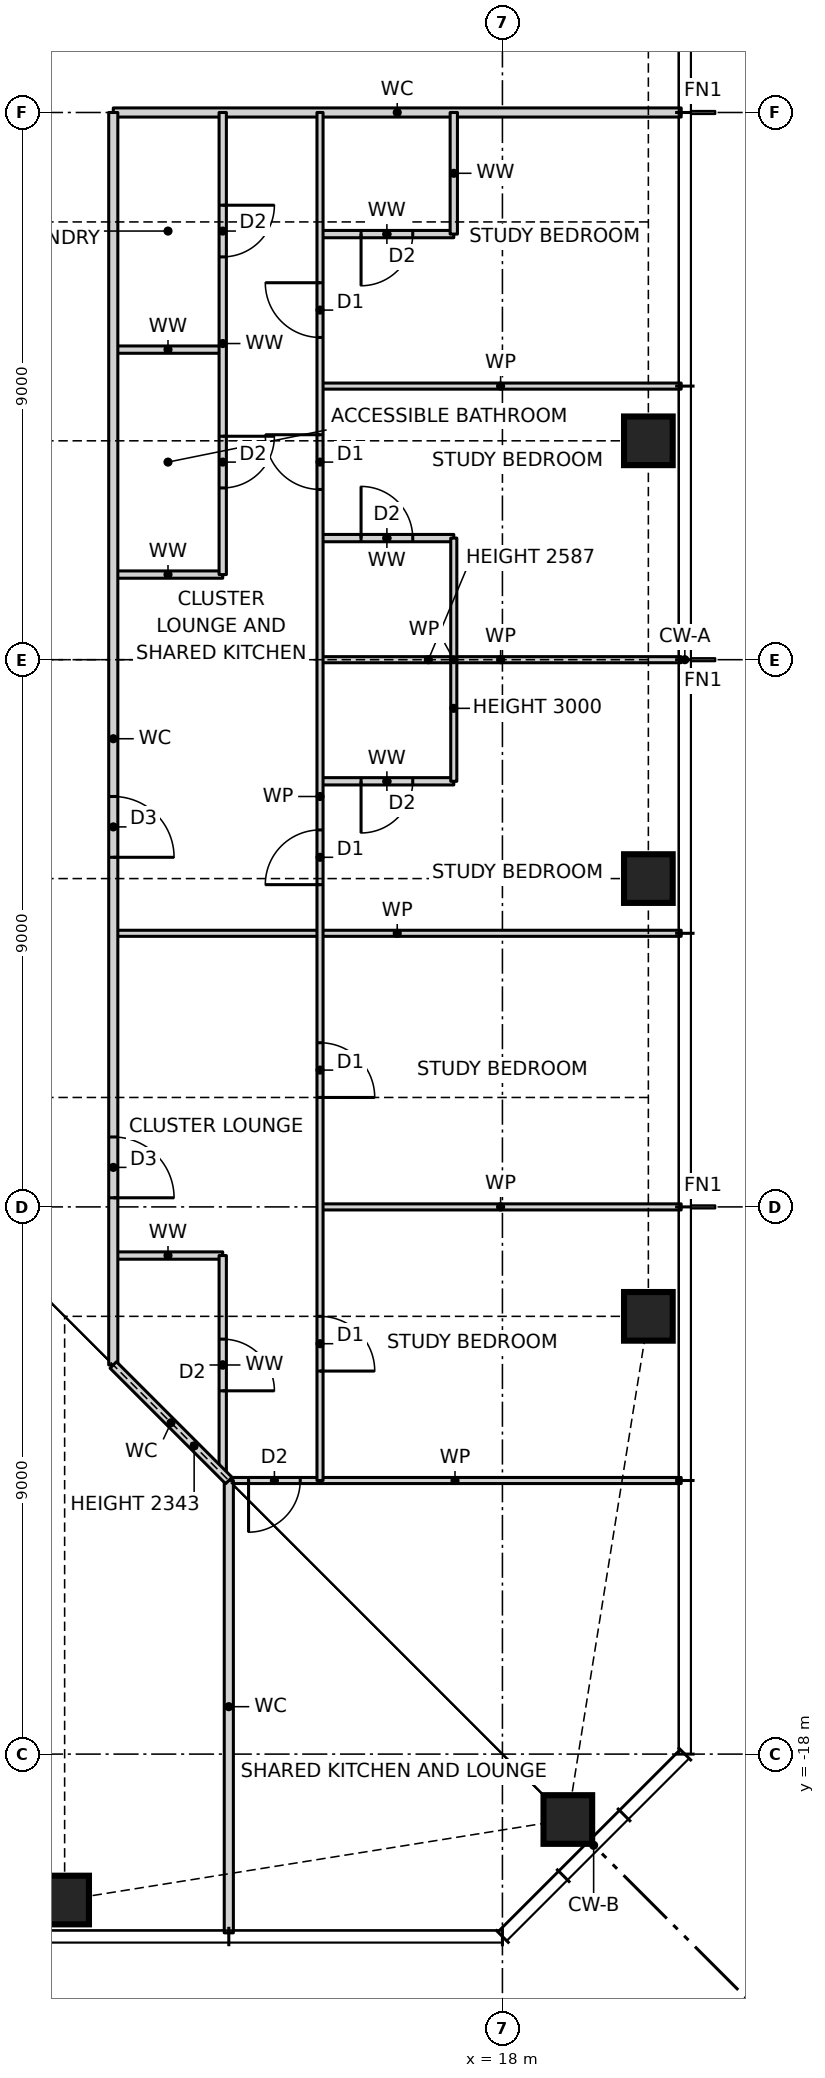
"""IFC4 building model, lengths in metres.
Left out: names, types, materials, properties, quantities, classifications, styles, units other than length and angle.
Written with IfcOpenShell. Run it as: python <this file> out.ifc"""

import sys

from ifc_helpers import new_model, si_unit, direction, frame, frame_2d, origin, origin_2d, place, context, subcontext, project, spatial, rectangle, hollow_rectangle, extrude, element, fill, save


model = new_model("IFC4")
c1 = context("Model", 3, precision=1e-05, world=origin(), true_north=direction((0.0, 1.0)))
c2 = subcontext(c1, "Body", "Model", "MODEL_VIEW")
j1 = project(units=[si_unit("LENGTHUNIT", "METRE"), si_unit("PLANEANGLEUNIT", "RADIAN")], contexts=[c1])
p1 = place(None, origin())
s1 = spatial("IfcSite", under=j1, at=p1, CompositionType="ELEMENT")
p2 = place(p1, origin())
s2 = spatial("IfcBuilding", under=s1, at=p2, CompositionType="ELEMENT")
p3 = place(p2, frame((0.0, 0.0, 133.0)))
s3 = spatial("IfcBuildingStorey", under=s2, at=p3, CompositionType="ELEMENT", Elevation=133.0)
for number, where, z_axis, x_axis in (
    (1, (10.8, -20.4, 0.0), (0.0, 0.0, 1.0), (1.0, 0.0, 0.0)),
    (2, (19.076, -19.076, 0.0), (0.0, 0.0, 1.0), (1.0, 0.0, 0.0)),
    (3, (20.4, -10.8, 0.0), (0.0, 0.0, 1.0), (1.0, 0.0, 0.0)),
    (4, (20.4, -3.6, 0.0), (0.0, 0.0, 1.0), (1.0, 0.0, 0.0)),
    (5, (20.4, 3.6, 0.0), (0.0, 0.0, 1.0), (1.0, 0.0, 0.0)),
):
    element("IfcColumn", number, at=place(p3, frame(where, z_axis=z_axis, x_axis=x_axis)), inside=s3, PredefinedType="COLUMN", context=c2, shape_type="SweptSolid", body=[
        extrude(hollow_rectangle(XDim=0.8, YDim=0.8, WallThickness=0.07, at=origin_2d()), origin(), (0.0, 0.0, 1.0), 3.5),
    ])
p4 = place(p3, frame((13.5, -13.5, 0.0), z_axis=(0.0, 0.0, 1.0), x_axis=(1.0, 0.0, 0.0)))
e6 = element("IfcWall", 6, at=p4, inside=s3, PredefinedType="PARTITIONING", context=c2, shape_type="SweptSolid", body=[
    extrude(rectangle(XDim=7.44, YDim=0.1, at=frame_2d((3.72, 0.0))), origin(), (0.0, 0.0, 1.0), 3.27),
])
p5 = place(p4, frame((0.325, 0.0, 0.0)))
e7 = element("IfcOpeningElement", 7, at=p5, cuts=e6, PredefinedType="OPENING", context=c2, shape_type="SweptSolid", body=[
    extrude(rectangle(XDim=0.85, YDim=2.1, at=frame_2d((0.425, 1.05))), frame((0.0, 0.06, 0.0), z_axis=(0.0, -1.0, 0.0), x_axis=(1.0, 0.0, 0.0)), (0.0, 0.0, 1.0), 0.12),
])
p6 = place(p3, frame((11.6, -9.8, 0.0), z_axis=(0.0, 0.0, 1.0), x_axis=(1.0, 0.0, 0.0)))
e8 = element("IfcWall", 8, at=p6, inside=s3, PredefinedType="PARTITIONING", context=c2, shape_type="SweptSolid", body=[
    extrude(rectangle(XDim=1.8, YDim=0.12, at=frame_2d((0.9, 0.0))), origin(), (0.0, 0.0, 1.0), 3.27),
])
p7 = place(p3, frame((15.0, -9.0, 0.0), z_axis=(0.0, 0.0, 1.0), x_axis=(1.0, 0.0, 0.0)))
e9 = element("IfcWall", 9, at=p7, inside=s3, PredefinedType="PARTITIONING", context=c2, shape_type="SweptSolid", body=[
    extrude(rectangle(XDim=5.94, YDim=0.1, at=frame_2d((2.97, 0.0))), origin(), (0.0, 0.0, 1.0), 3.27),
])
p8 = place(p3, frame((11.6, -4.5, 0.0), z_axis=(0.0, 0.0, 1.0), x_axis=(1.0, 0.0, 0.0)))
e10 = element("IfcWall", 10, at=p8, inside=s3, PredefinedType="PARTITIONING", context=c2, shape_type="SweptSolid", body=[
    extrude(rectangle(XDim=9.34, YDim=0.1, at=frame_2d((4.67, 0.0))), origin(), (0.0, 0.0, 1.0), 3.27),
])
p9 = place(p3, frame((15.0, -2.0, 0.0), z_axis=(0.0, 0.0, 1.0), x_axis=(1.0, 0.0, 0.0)))
e11 = element("IfcWall", 11, at=p9, inside=s3, PredefinedType="PARTITIONING", context=c2, shape_type="SweptSolid", body=[
    extrude(rectangle(XDim=2.2, YDim=0.12, at=frame_2d((1.1, 0.0))), origin(), (0.0, 0.0, 1.0), 3.27),
])
p10 = place(p9, frame((0.675, 0.0, 0.0)))
e12 = element("IfcOpeningElement", 12, at=p10, cuts=e11, PredefinedType="OPENING", context=c2, shape_type="SweptSolid", body=[
    extrude(rectangle(XDim=0.85, YDim=2.1, at=frame_2d((0.425, 1.05))), frame((0.0, 0.07, 0.0), z_axis=(0.0, -1.0, 0.0), x_axis=(1.0, 0.0, 0.0)), (0.0, 0.0, 1.0), 0.14),
])
p11 = place(p3, frame((15.0, 0.0, 0.0), z_axis=(0.0, 0.0, 1.0), x_axis=(1.0, 0.0, 0.0)))
e13 = element("IfcWall", 13, at=p11, inside=s3, PredefinedType="PARTITIONING", context=c2, shape_type="SweptSolid", body=[
    extrude(rectangle(XDim=5.94, YDim=0.1, at=frame_2d((2.97, 0.0))), origin(), (0.0, 0.0, 1.0), 2.587),
])
p12 = place(p3, frame((11.6, 1.4, 0.0), z_axis=(0.0, 0.0, 1.0), x_axis=(1.0, 0.0, 0.0)))
e14 = element("IfcWall", 14, at=p12, inside=s3, PredefinedType="PARTITIONING", context=c2, shape_type="SweptSolid", body=[
    extrude(rectangle(XDim=1.8, YDim=0.12, at=frame_2d((0.9, 0.0))), origin(), (0.0, 0.0, 1.0), 3.27),
])
p13 = place(p3, frame((15.0, 2.0, 0.0), z_axis=(0.0, 0.0, 1.0), x_axis=(1.0, 0.0, 0.0)))
e15 = element("IfcWall", 15, at=p13, inside=s3, PredefinedType="PARTITIONING", context=c2, shape_type="SweptSolid", body=[
    extrude(rectangle(XDim=2.2, YDim=0.12, at=frame_2d((1.1, 0.0))), origin(), (0.0, 0.0, 1.0), 3.27),
])
p14 = place(p13, frame((0.675, 0.0, 0.0)))
e16 = element("IfcOpeningElement", 16, at=p14, cuts=e15, PredefinedType="OPENING", context=c2, shape_type="SweptSolid", body=[
    extrude(rectangle(XDim=0.85, YDim=2.1, at=frame_2d((0.425, 1.05))), frame((0.0, 0.07, 0.0), z_axis=(0.0, -1.0, 0.0), x_axis=(1.0, 0.0, 0.0)), (0.0, 0.0, 1.0), 0.14),
])
p15 = place(p3, frame((15.0, 4.5, 0.0), z_axis=(0.0, 0.0, 1.0), x_axis=(1.0, 0.0, 0.0)))
e17 = element("IfcWall", 17, at=p15, inside=s3, PredefinedType="PARTITIONING", context=c2, shape_type="SweptSolid", body=[
    extrude(rectangle(XDim=5.94, YDim=0.1, at=frame_2d((2.97, 0.0))), origin(), (0.0, 0.0, 1.0), 3.27),
])
p16 = place(p3, frame((11.6, 5.1, 0.0), z_axis=(0.0, 0.0, 1.0), x_axis=(1.0, 0.0, 0.0)))
e18 = element("IfcWall", 18, at=p16, inside=s3, PredefinedType="PARTITIONING", context=c2, shape_type="SweptSolid", body=[
    extrude(rectangle(XDim=1.8, YDim=0.12, at=frame_2d((0.9, 0.0))), origin(), (0.0, 0.0, 1.0), 3.27),
])
p17 = place(p3, frame((15.0, 7.0, 0.0), z_axis=(0.0, 0.0, 1.0), x_axis=(1.0, 0.0, 0.0)))
e19 = element("IfcWall", 19, at=p17, inside=s3, PredefinedType="PARTITIONING", context=c2, shape_type="SweptSolid", body=[
    extrude(rectangle(XDim=2.2, YDim=0.12, at=frame_2d((1.1, 0.0))), origin(), (0.0, 0.0, 1.0), 3.27),
])
p18 = place(p17, frame((0.675, 0.0, 0.0)))
e20 = element("IfcOpeningElement", 20, at=p18, cuts=e19, PredefinedType="OPENING", context=c2, shape_type="SweptSolid", body=[
    extrude(rectangle(XDim=0.85, YDim=2.1, at=frame_2d((0.425, 1.05))), frame((0.0, 0.07, 0.0), z_axis=(0.0, -1.0, 0.0), x_axis=(1.0, 0.0, 0.0)), (0.0, 0.0, 1.0), 0.14),
])
p19 = place(p3, frame((11.6, 9.0, 0.0), z_axis=(0.0, 0.0, 1.0), x_axis=(1.0, 0.0, 0.0)))
e21 = element("IfcWall", 21, at=p19, inside=s3, PredefinedType="PARTITIONING", context=c2, shape_type="SweptSolid", body=[
    extrude(rectangle(XDim=9.34, YDim=0.15, at=frame_2d((4.67, 0.0))), origin(), (0.0, 0.0, 1.0), 3.27),
])
p20 = place(p3, frame((17.2, -2.0, 0.0), z_axis=(0.0, 0.0, 1.0), x_axis=(0.0, 1.0, 0.0)))
e22 = element("IfcWall", 22, at=p20, inside=s3, PredefinedType="PARTITIONING", context=c2, shape_type="SweptSolid", body=[
    extrude(rectangle(XDim=4.0, YDim=0.1, at=frame_2d((2.0, 0.0))), origin(), (0.0, 0.0, 1.0), 3.0),
])
p21 = place(p3, frame((17.2, 7.0, 0.0), z_axis=(0.0, 0.0, 1.0), x_axis=(0.0, 1.0, 0.0)))
e23 = element("IfcWall", 23, at=p21, inside=s3, PredefinedType="PARTITIONING", context=c2, shape_type="SweptSolid", body=[
    extrude(rectangle(XDim=2.0, YDim=0.12, at=frame_2d((1.0, 0.0))), origin(), (0.0, 0.0, 1.0), 3.27),
])
p22 = place(p3, frame((15.0, -13.5, 0.0), z_axis=(0.0, 0.0, 1.0), x_axis=(0.0, 1.0, 0.0)))
e24 = element("IfcWall", 24, at=p22, inside=s3, PredefinedType="PARTITIONING", context=c2, shape_type="SweptSolid", body=[
    extrude(rectangle(XDim=22.5, YDim=0.1, at=frame_2d((11.25, 0.0))), origin(), (0.0, 0.0, 1.0), 3.27),
])
p23 = place(p22, frame((1.8, 0.0, 0.0)))
e25 = element("IfcOpeningElement", 25, at=p23, cuts=e24, PredefinedType="OPENING", context=c2, shape_type="SweptSolid", body=[
    extrude(rectangle(XDim=0.9, YDim=2.1, at=frame_2d((0.45, 1.05))), frame((0.0, 0.06, 0.0), z_axis=(0.0, -1.0, 0.0), x_axis=(1.0, 0.0, 0.0)), (0.0, 0.0, 1.0), 0.12),
])
p24 = place(p22, frame((6.3, 0.0, 0.0)))
e26 = element("IfcOpeningElement", 26, at=p24, cuts=e24, PredefinedType="OPENING", context=c2, shape_type="SweptSolid", body=[
    extrude(rectangle(XDim=0.9, YDim=2.1, at=frame_2d((0.45, 1.05))), frame((0.0, 0.06, 0.0), z_axis=(0.0, -1.0, 0.0), x_axis=(1.0, 0.0, 0.0)), (0.0, 0.0, 1.0), 0.12),
])
p25 = place(p22, frame((9.8, 0.0, 0.0)))
e27 = element("IfcOpeningElement", 27, at=p25, cuts=e24, PredefinedType="OPENING", context=c2, shape_type="SweptSolid", body=[
    extrude(rectangle(XDim=0.9, YDim=2.1, at=frame_2d((0.45, 1.05))), frame((0.0, 0.06, 0.0), z_axis=(0.0, -1.0, 0.0), x_axis=(1.0, 0.0, 0.0)), (0.0, 0.0, 1.0), 0.12),
])
p26 = place(p22, frame((16.3, 0.0, 0.0)))
e28 = element("IfcOpeningElement", 28, at=p26, cuts=e24, PredefinedType="OPENING", context=c2, shape_type="SweptSolid", body=[
    extrude(rectangle(XDim=0.9, YDim=2.1, at=frame_2d((0.45, 1.05))), frame((0.0, 0.06, 0.0), z_axis=(0.0, -1.0, 0.0), x_axis=(1.0, 0.0, 0.0)), (0.0, 0.0, 1.0), 0.12),
])
p27 = place(p22, frame((18.8, 0.0, 0.0)))
e29 = element("IfcOpeningElement", 29, at=p27, cuts=e24, PredefinedType="OPENING", context=c2, shape_type="SweptSolid", body=[
    extrude(rectangle(XDim=0.9, YDim=2.1, at=frame_2d((0.45, 1.05))), frame((0.0, 0.06, 0.0), z_axis=(0.0, -1.0, 0.0), x_axis=(1.0, 0.0, 0.0)), (0.0, 0.0, 1.0), 0.12),
])
p28 = place(p3, frame((13.5, -20.94, 0.0), z_axis=(0.0, 0.0, 1.0), x_axis=(0.0, 1.0, 0.0)))
e30 = element("IfcWall", 30, at=p28, inside=s3, PredefinedType="PARTITIONING", context=c2, shape_type="SweptSolid", body=[
    extrude(rectangle(XDim=7.44, YDim=0.15, at=frame_2d((3.72, 0.0))), origin(), (0.0, 0.0, 1.0), 3.27),
])
p29 = place(p3, frame((13.4, -13.4, 0.0), z_axis=(0.0, 0.0, 1.0), x_axis=(0.0, 1.0, 0.0)))
e31 = element("IfcWall", 31, at=p29, inside=s3, PredefinedType="PARTITIONING", context=c2, shape_type="SweptSolid", body=[
    extrude(rectangle(XDim=3.6, YDim=0.12, at=frame_2d((1.8, 0.0))), origin(), (0.0, 0.0, 1.0), 3.27),
])
p30 = place(p29, frame((1.375, 0.0, 0.0)))
e32 = element("IfcOpeningElement", 32, at=p30, cuts=e31, PredefinedType="OPENING", context=c2, shape_type="SweptSolid", body=[
    extrude(rectangle(XDim=0.85, YDim=2.1, at=frame_2d((0.425, 1.05))), frame((0.0, 0.07, 0.0), z_axis=(0.0, -1.0, 0.0), x_axis=(1.0, 0.0, 0.0)), (0.0, 0.0, 1.0), 0.14),
])
p31 = place(p3, frame((13.4, 1.4, 0.0), z_axis=(0.0, 0.0, 1.0), x_axis=(0.0, 1.0, 0.0)))
e33 = element("IfcWall", 33, at=p31, inside=s3, PredefinedType="PARTITIONING", context=c2, shape_type="SweptSolid", body=[
    extrude(rectangle(XDim=7.6, YDim=0.12, at=frame_2d((3.8, 0.0))), origin(), (0.0, 0.0, 1.0), 3.27),
])
p32 = place(p31, frame((1.425, 0.0, 0.0)))
e34 = element("IfcOpeningElement", 34, at=p32, cuts=e33, PredefinedType="OPENING", context=c2, shape_type="SweptSolid", body=[
    extrude(rectangle(XDim=0.85, YDim=2.1, at=frame_2d((0.425, 1.05))), frame((0.0, 0.07, 0.0), z_axis=(0.0, -1.0, 0.0), x_axis=(1.0, 0.0, 0.0)), (0.0, 0.0, 1.0), 0.14),
])
p33 = place(p31, frame((5.225, 0.0, 0.0)))
e35 = element("IfcOpeningElement", 35, at=p33, cuts=e33, PredefinedType="OPENING", context=c2, shape_type="SweptSolid", body=[
    extrude(rectangle(XDim=0.85, YDim=2.1, at=frame_2d((0.425, 1.05))), frame((0.0, 0.07, 0.0), z_axis=(0.0, -1.0, 0.0), x_axis=(1.0, 0.0, 0.0)), (0.0, 0.0, 1.0), 0.14),
])
p34 = place(p3, frame((11.6, -11.6, 0.0), z_axis=(0.0, 0.0, 1.0), x_axis=(0.0, 1.0, 0.0)))
e36 = element("IfcWall", 36, at=p34, inside=s3, PredefinedType="PARTITIONING", context=c2, shape_type="SweptSolid", body=[
    extrude(rectangle(XDim=20.6, YDim=0.15, at=frame_2d((10.3, 0.0))), origin(), (0.0, 0.0, 1.0), 3.27),
])
p35 = place(p34, frame((2.75, 0.0, 0.0)))
e37 = element("IfcOpeningElement", 37, at=p35, cuts=e36, PredefinedType="OPENING", context=c2, shape_type="SweptSolid", body=[
    extrude(rectangle(XDim=1.0, YDim=2.1, at=frame_2d((0.5, 1.05))), frame((0.0, 0.085, 0.0), z_axis=(0.0, -1.0, 0.0), x_axis=(1.0, 0.0, 0.0)), (0.0, 0.0, 1.0), 0.17),
])
p36 = place(p34, frame((8.35, 0.0, 0.0)))
e38 = element("IfcOpeningElement", 38, at=p36, cuts=e36, PredefinedType="OPENING", context=c2, shape_type="SweptSolid", body=[
    extrude(rectangle(XDim=1.0, YDim=2.1, at=frame_2d((0.5, 1.05))), frame((0.0, 0.085, 0.0), z_axis=(0.0, -1.0, 0.0), x_axis=(1.0, 0.0, 0.0)), (0.0, 0.0, 1.0), 0.17),
])
p37 = place(p3, frame((13.5, -13.5, 0.0), z_axis=(0.0, 0.0, 1.0), x_axis=(-0.707106781187, 0.707106781187, 0.0)))
e39 = element("IfcWall", 39, at=p37, inside=s3, PredefinedType="PARTITIONING", context=c2, shape_type="SweptSolid", body=[
    extrude(rectangle(XDim=2.687, YDim=0.15, at=frame_2d((1.343, 0.0))), origin(), (0.0, 0.0, 1.0), 2.343),
])
p38 = place(p23, frame((0.9, 0.0, 0.0), z_axis=(0.0, 0.0, 1.0), x_axis=(-1.0, 0.0, 0.0)))
e40 = element("IfcDoor", 40, at=p38, inside=s3, OperationType="SINGLE_SWING_RIGHT", PredefinedType="DOOR", context=c2, shape_type="SweptSolid", body=[
    extrude(rectangle(XDim=0.9, YDim=2.1, at=frame_2d((0.45, 1.05))), frame((0.0, 0.025, 0.0), z_axis=(0.0, -1.0, 0.0), x_axis=(1.0, 0.0, 0.0)), (0.0, 0.0, 1.0), 0.05),
])
fill(e25, e40)
p39 = place(p24, frame((0.9, 0.0, 0.0), z_axis=(0.0, 0.0, 1.0), x_axis=(-1.0, 0.0, 0.0)))
e41 = element("IfcDoor", 41, at=p39, inside=s3, OperationType="SINGLE_SWING_RIGHT", PredefinedType="DOOR", context=c2, shape_type="SweptSolid", body=[
    extrude(rectangle(XDim=0.9, YDim=2.1, at=frame_2d((0.45, 1.05))), frame((0.0, 0.025, 0.0), z_axis=(0.0, -1.0, 0.0), x_axis=(1.0, 0.0, 0.0)), (0.0, 0.0, 1.0), 0.05),
])
fill(e26, e41)
p40 = place(p35, frame((1.0, 0.0, 0.0), z_axis=(0.0, 0.0, 1.0), x_axis=(-1.0, 0.0, 0.0)))
e42 = element("IfcDoor", 42, at=p40, inside=s3, OperationType="SINGLE_SWING_RIGHT", PredefinedType="DOOR", context=c2, shape_type="SweptSolid", body=[
    extrude(rectangle(XDim=1.0, YDim=2.1, at=frame_2d((0.5, 1.05))), frame((0.0, 0.025, 0.0), z_axis=(0.0, -1.0, 0.0), x_axis=(1.0, 0.0, 0.0)), (0.0, 0.0, 1.0), 0.05),
])
fill(e37, e42)
p41 = place(p30, frame((0.85, 0.0, 0.0), z_axis=(0.0, 0.0, 1.0), x_axis=(-1.0, 0.0, 0.0)))
e43 = element("IfcDoor", 43, at=p41, inside=s3, OperationType="SINGLE_SWING_RIGHT", PredefinedType="DOOR", context=c2, shape_type="SweptSolid", body=[
    extrude(rectangle(XDim=0.85, YDim=2.1, at=frame_2d((0.425, 1.05))), frame((0.0, 0.025, 0.0), z_axis=(0.0, -1.0, 0.0), x_axis=(1.0, 0.0, 0.0)), (0.0, 0.0, 1.0), 0.05),
])
fill(e32, e43)
p42 = place(p10, frame((0.85, 0.0, 0.0), z_axis=(0.0, 0.0, 1.0), x_axis=(-1.0, 0.0, 0.0)))
e44 = element("IfcDoor", 44, at=p42, inside=s3, OperationType="SINGLE_SWING_RIGHT", PredefinedType="DOOR", context=c2, shape_type="SweptSolid", body=[
    extrude(rectangle(XDim=0.85, YDim=2.1, at=frame_2d((0.425, 1.05))), frame((0.0, 0.025, 0.0), z_axis=(0.0, -1.0, 0.0), x_axis=(1.0, 0.0, 0.0)), (0.0, 0.0, 1.0), 0.05),
])
fill(e12, e44)
p43 = place(p25, origin())
e45 = element("IfcDoor", 45, at=p43, inside=s3, OperationType="SINGLE_SWING_LEFT", PredefinedType="DOOR", context=c2, shape_type="SweptSolid", body=[
    extrude(rectangle(XDim=0.9, YDim=2.1, at=frame_2d((0.45, 1.05))), frame((0.0, 0.025, 0.0), z_axis=(0.0, -1.0, 0.0), x_axis=(1.0, 0.0, 0.0)), (0.0, 0.0, 1.0), 0.05),
])
fill(e27, e45)
p44 = place(p14, origin())
e46 = element("IfcDoor", 46, at=p44, inside=s3, OperationType="SINGLE_SWING_LEFT", PredefinedType="DOOR", context=c2, shape_type="SweptSolid", body=[
    extrude(rectangle(XDim=0.85, YDim=2.1, at=frame_2d((0.425, 1.05))), frame((0.0, 0.025, 0.0), z_axis=(0.0, -1.0, 0.0), x_axis=(1.0, 0.0, 0.0)), (0.0, 0.0, 1.0), 0.05),
])
fill(e16, e46)
p45 = place(p26, origin())
e47 = element("IfcDoor", 47, at=p45, inside=s3, OperationType="SINGLE_SWING_RIGHT", PredefinedType="DOOR", context=c2, shape_type="SweptSolid", body=[
    extrude(rectangle(XDim=0.9, YDim=2.1, at=frame_2d((0.45, 1.05))), frame((0.0, 0.025, 0.0), z_axis=(0.0, -1.0, 0.0), x_axis=(1.0, 0.0, 0.0)), (0.0, 0.0, 1.0), 0.05),
])
fill(e28, e47)
p46 = place(p18, frame((0.85, 0.0, 0.0), z_axis=(0.0, 0.0, 1.0), x_axis=(-1.0, 0.0, 0.0)))
e48 = element("IfcDoor", 48, at=p46, inside=s3, OperationType="SINGLE_SWING_RIGHT", PredefinedType="DOOR", context=c2, shape_type="SweptSolid", body=[
    extrude(rectangle(XDim=0.85, YDim=2.1, at=frame_2d((0.425, 1.05))), frame((0.0, 0.025, 0.0), z_axis=(0.0, -1.0, 0.0), x_axis=(1.0, 0.0, 0.0)), (0.0, 0.0, 1.0), 0.05),
])
fill(e20, e48)
p47 = place(p27, origin())
e49 = element("IfcDoor", 49, at=p47, inside=s3, OperationType="SINGLE_SWING_RIGHT", PredefinedType="DOOR", context=c2, shape_type="SweptSolid", body=[
    extrude(rectangle(XDim=0.9, YDim=2.1, at=frame_2d((0.45, 1.05))), frame((0.0, 0.025, 0.0), z_axis=(0.0, -1.0, 0.0), x_axis=(1.0, 0.0, 0.0)), (0.0, 0.0, 1.0), 0.05),
])
fill(e29, e49)
p48 = place(p36, frame((1.0, 0.0, 0.0), z_axis=(0.0, 0.0, 1.0), x_axis=(-1.0, 0.0, 0.0)))
e50 = element("IfcDoor", 50, at=p48, inside=s3, OperationType="SINGLE_SWING_RIGHT", PredefinedType="DOOR", context=c2, shape_type="SweptSolid", body=[
    extrude(rectangle(XDim=1.0, YDim=2.1, at=frame_2d((0.5, 1.05))), frame((0.0, 0.025, 0.0), z_axis=(0.0, -1.0, 0.0), x_axis=(1.0, 0.0, 0.0)), (0.0, 0.0, 1.0), 0.05),
])
fill(e38, e50)
p49 = place(p32, frame((0.85, 0.0, 0.0), z_axis=(0.0, 0.0, 1.0), x_axis=(-1.0, 0.0, 0.0)))
e51 = element("IfcDoor", 51, at=p49, inside=s3, OperationType="SINGLE_SWING_LEFT", PredefinedType="DOOR", context=c2, shape_type="SweptSolid", body=[
    extrude(rectangle(XDim=0.85, YDim=2.1, at=frame_2d((0.425, 1.05))), frame((0.0, 0.025, 0.0), z_axis=(0.0, -1.0, 0.0), x_axis=(1.0, 0.0, 0.0)), (0.0, 0.0, 1.0), 0.05),
])
fill(e34, e51)
p50 = place(p33, frame((0.85, 0.0, 0.0), z_axis=(0.0, 0.0, 1.0), x_axis=(-1.0, 0.0, 0.0)))
e52 = element("IfcDoor", 52, at=p50, inside=s3, OperationType="SINGLE_SWING_LEFT", PredefinedType="DOOR", context=c2, shape_type="SweptSolid", body=[
    extrude(rectangle(XDim=0.85, YDim=2.1, at=frame_2d((0.425, 1.05))), frame((0.0, 0.025, 0.0), z_axis=(0.0, -1.0, 0.0), x_axis=(1.0, 0.0, 0.0)), (0.0, 0.0, 1.0), 0.05),
])
fill(e35, e52)
p51 = place(p5, frame((0.85, 0.0, 0.0), z_axis=(0.0, 0.0, 1.0), x_axis=(-1.0, 0.0, 0.0)))
e53 = element("IfcDoor", 53, at=p51, inside=s3, OperationType="SINGLE_SWING_RIGHT", PredefinedType="DOOR", context=c2, shape_type="SweptSolid", body=[
    extrude(rectangle(XDim=0.85, YDim=2.1, at=frame_2d((0.425, 1.05))), frame((0.0, 0.025, 0.0), z_axis=(0.0, -1.0, 0.0), x_axis=(1.0, 0.0, 0.0)), (0.0, 0.0, 1.0), 0.05),
])
fill(e7, e53)
save(model, sys.argv[1])
